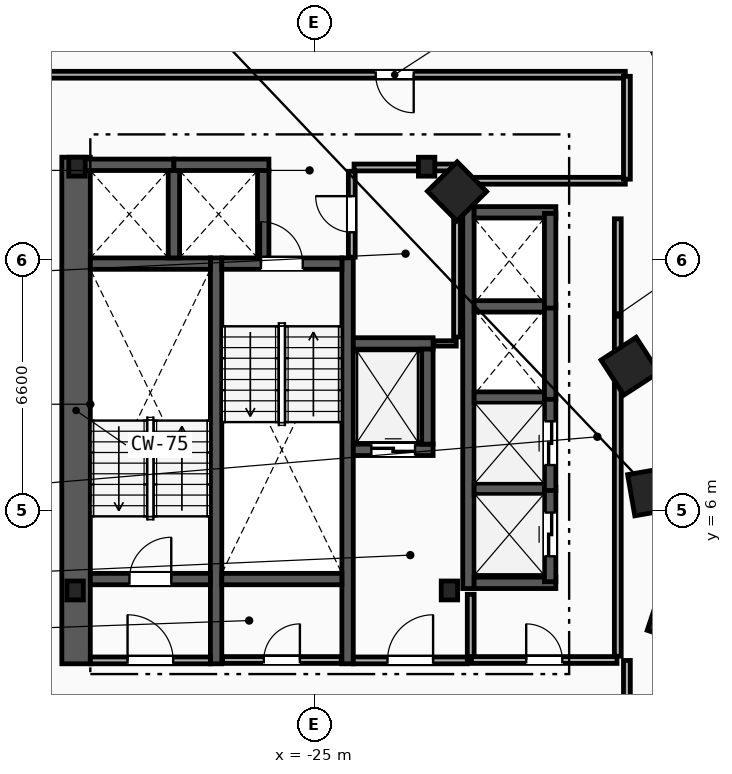
"""IFC4 building model, lengths in metres.
Left out: names, types, materials, properties, quantities, classifications, styles, units other than length and angle.
Written with IfcOpenShell. Run it as: python <this file> out.ifc"""

import sys

from ifc_helpers import new_model, si_unit, direction, frame, frame_2d, origin, origin_2d, place, context, subcontext, project, spatial, rectangle, i_section, extrude, element, fill, save


model = new_model("IFC4")
c1 = context("Model", 3, precision=1e-05, world=origin(), true_north=direction((0.0, 1.0)))
c2 = subcontext(c1, "Body", "Model", "MODEL_VIEW")
j1 = project(units=[si_unit("LENGTHUNIT", "METRE"), si_unit("PLANEANGLEUNIT", "RADIAN")], contexts=[c1])
p1 = place(None, origin())
s1 = spatial("IfcSite", under=j1, at=p1, CompositionType="ELEMENT")
p2 = place(p1, origin())
s2 = spatial("IfcBuilding", under=s1, at=p2, CompositionType="ELEMENT")
p3 = place(p2, frame((0.0, 0.0, 103.4)))
s3 = spatial("IfcBuildingStorey", under=s2, at=p3, CompositionType="ELEMENT", Elevation=103.4)
for number, where, z_axis, x_axis in (
    (1, (-31.3, 3.9, 0.0), (0.0, 0.0, 1.0), (1.0, 0.0, 0.0)),
    (2, (-21.45, 3.9, 0.0), (0.0, 0.0, 1.0), (1.0, 0.0, 0.0)),
    (3, (-22.05, 15.05, 0.0), (0.0, 0.0, 1.0), (1.0, 0.0, 0.0)),
    (4, (-31.25, 15.05, 0.0), (0.0, 0.0, 1.0), (1.0, 0.0, 0.0)),
):
    element("IfcColumn", number, at=place(p3, frame(where, z_axis=z_axis, x_axis=x_axis)), inside=s3, PredefinedType="COLUMN", context=c2, shape_type="SweptSolid", body=[
        extrude(i_section(OverallWidth=0.432, OverallDepth=0.498, WebThickness=0.056, FlangeThickness=0.089, FilletRadius=0.018, at=origin_2d()), origin(), (0.0, 0.0, 1.0), 3.6),
    ])
for number, where, z_axis, x_axis in (
    (5, (-15.55, 3.2, 0.0), (0.0, 0.0, 1.0), (0.315, 0.949, 0.0)),
    (6, (-16.125, 6.5, 0.0), (0.0, 0.0, 1.0), (-0.172, 0.985, 0.0)),
    (7, (-16.7, 9.8, 0.0), (0.0, 0.0, 1.0), (-0.544, 0.839, 0.0)),
    (8, (-21.25, 14.4, 0.0), (0.0, 0.0, 1.0), (-0.703, 0.711, 0.0)),
):
    element("IfcColumn", number, at=place(p3, frame(where, z_axis=z_axis, x_axis=x_axis)), inside=s3, PredefinedType="COLUMN", context=c2, shape_type="SweptSolid", body=[
        extrude(rectangle(XDim=1.1, YDim=1.1, at=origin_2d()), origin(), (0.0, 0.0, 1.0), 3.6),
    ])
p4 = place(p3, frame((-31.275, 1.97, 0.0), z_axis=(0.0, 0.0, 1.0), x_axis=(0.0, 1.0, 0.0)))
e9 = element("IfcWall", 9, at=p4, inside=s3, PredefinedType="SHEAR", context=c2, shape_type="SweptSolid", body=[
    extrude(rectangle(XDim=13.33, YDim=0.75, at=frame_2d((6.665, 0.0))), origin(), (0.0, 0.0, 1.0), 3.3),
])
for number, where, z_axis, x_axis in (
    (10, (-27.59, 1.97, 0.0), (0.0, 0.0, 1.0), (0.0, 1.0, 0.0)),
    (11, (-24.13, 1.97, 0.0), (0.0, 0.0, 1.0), (0.0, 1.0, 0.0)),
):
    element("IfcWall", number, at=place(p3, frame(where, z_axis=z_axis, x_axis=x_axis)), inside=s3, PredefinedType="SHEAR", context=c2, shape_type="SweptSolid", body=[
        extrude(rectangle(XDim=10.68, YDim=0.3, at=frame_2d((5.34, 0.0))), origin(), (0.0, 0.0, 1.0), 3.3),
    ])
p5 = place(p3, frame((-30.9, 4.2, 0.0), z_axis=(0.0, 0.0, 1.0), x_axis=(1.0, 0.0, 0.0)))
e12 = element("IfcWall", 12, at=p5, inside=s3, PredefinedType="SHEAR", context=c2, shape_type="SweptSolid", body=[
    extrude(rectangle(XDim=3.16, YDim=0.3, at=frame_2d((1.58, 0.0))), origin(), (0.0, 0.0, 1.0), 3.3),
])
p6 = place(p5, frame((1.03, 0.0, 0.0)))
e13 = element("IfcOpeningElement", 13, at=p6, cuts=e12, PredefinedType="OPENING", context=c2, shape_type="SweptSolid", body=[
    extrude(rectangle(XDim=1.1, YDim=2.15, at=frame_2d((0.55, 1.075))), frame((0.0, 0.16, 0.0), z_axis=(0.0, -1.0, 0.0), x_axis=(1.0, 0.0, 0.0)), (0.0, 0.0, 1.0), 0.32),
])
p7 = place(p3, frame((-30.9, 12.5, 0.0), z_axis=(0.0, 0.0, 1.0), x_axis=(1.0, 0.0, 0.0)))
e14 = element("IfcWall", 14, at=p7, inside=s3, PredefinedType="SHEAR", context=c2, shape_type="SweptSolid", body=[
    extrude(rectangle(XDim=3.16, YDim=0.3, at=frame_2d((1.58, 0.0))), origin(), (0.0, 0.0, 1.0), 3.3),
])
p8 = place(p3, frame((-27.44, 12.5, 0.0), z_axis=(0.0, 0.0, 1.0), x_axis=(1.0, 0.0, 0.0)))
e15 = element("IfcWall", 15, at=p8, inside=s3, PredefinedType="SHEAR", context=c2, shape_type="SweptSolid", body=[
    extrude(rectangle(XDim=3.16, YDim=0.3, at=frame_2d((1.58, 0.0))), origin(), (0.0, 0.0, 1.0), 3.3),
])
p9 = place(p8, frame((1.03, 0.0, 0.0)))
e16 = element("IfcOpeningElement", 16, at=p9, cuts=e15, PredefinedType="OPENING", context=c2, shape_type="SweptSolid", body=[
    extrude(rectangle(XDim=1.1, YDim=2.15, at=frame_2d((0.55, 1.075))), frame((0.0, 0.16, 0.0), z_axis=(0.0, -1.0, 0.0), x_axis=(1.0, 0.0, 0.0)), (0.0, 0.0, 1.0), 0.32),
])
p10 = place(p3, frame((-27.44, 4.2, 0.0), z_axis=(0.0, 0.0, 1.0), x_axis=(1.0, 0.0, 0.0)))
e17 = element("IfcWall", 17, at=p10, inside=s3, PredefinedType="SHEAR", context=c2, shape_type="SweptSolid", body=[
    extrude(rectangle(XDim=3.16, YDim=0.3, at=frame_2d((1.58, 0.0))), origin(), (0.0, 0.0, 1.0), 3.3),
])
p11 = place(p3, frame((-20.89, 2.15, 0.0), z_axis=(0.0, 0.0, 1.0), x_axis=(0.0, 1.0, 0.0)))
e18 = element("IfcWall", 18, at=p11, inside=s3, PredefinedType="PARTITIONING", context=c2, shape_type="SweptSolid", body=[
    extrude(rectangle(XDim=1.65, YDim=0.18, at=frame_2d((0.825, 0.0))), origin(), (0.0, 0.0, 1.0), 3.3),
])
p12 = place(p3, frame((-23.98, 2.06, 0.0), z_axis=(0.0, 0.0, 1.0), x_axis=(1.0, 0.0, 0.0)))
e19 = element("IfcWall", 19, at=p12, inside=s3, PredefinedType="PARTITIONING", context=c2, shape_type="SweptSolid", body=[
    extrude(rectangle(XDim=3.0, YDim=0.18, at=frame_2d((1.5, 0.0))), origin(), (0.0, 0.0, 1.0), 3.3),
])
p13 = place(p12, frame((0.9, 0.0, 0.0)))
e20 = element("IfcOpeningElement", 20, at=p13, cuts=e19, PredefinedType="OPENING", context=c2, shape_type="SweptSolid", body=[
    extrude(rectangle(XDim=1.2, YDim=2.15, at=frame_2d((0.6, 1.075))), frame((0.0, 0.1, 0.0), z_axis=(0.0, -1.0, 0.0), x_axis=(1.0, 0.0, 0.0)), (0.0, 0.0, 1.0), 0.2),
])
p14 = place(p3, frame((-30.9, 2.06, 0.0), z_axis=(0.0, 0.0, 1.0), x_axis=(1.0, 0.0, 0.0)))
e21 = element("IfcWall", 21, at=p14, inside=s3, PredefinedType="PARTITIONING", context=c2, shape_type="SweptSolid", body=[
    extrude(rectangle(XDim=3.16, YDim=0.18, at=frame_2d((1.58, 0.0))), origin(), (0.0, 0.0, 1.0), 3.3),
])
p15 = place(p14, frame((0.98, 0.0, 0.0)))
e22 = element("IfcOpeningElement", 22, at=p15, cuts=e21, PredefinedType="OPENING", context=c2, shape_type="SweptSolid", body=[
    extrude(rectangle(XDim=1.2, YDim=2.15, at=frame_2d((0.6, 1.075))), frame((0.0, 0.1, 0.0), z_axis=(0.0, -1.0, 0.0), x_axis=(1.0, 0.0, 0.0)), (0.0, 0.0, 1.0), 0.2),
])
p16 = place(p3, frame((-23.98, 7.6, 0.0), z_axis=(0.0, 0.0, 1.0), x_axis=(1.0, 0.0, 0.0)))
e23 = element("IfcWall", 23, at=p16, inside=s3, PredefinedType="SHEAR", context=c2, shape_type="SweptSolid", body=[
    extrude(rectangle(XDim=2.1, YDim=0.3, at=frame_2d((1.05, 0.0))), origin(), (0.0, 0.0, 1.0), 3.3),
])
p17 = place(p16, frame((0.475, 0.0, 0.0)))
e24 = element("IfcOpeningElement", 24, at=p17, cuts=e23, PredefinedType="OPENING", context=c2, shape_type="SweptSolid", body=[
    extrude(rectangle(XDim=1.15, YDim=2.2, at=frame_2d((0.575, 1.1))), frame((0.0, 0.16, 0.0), z_axis=(0.0, -1.0, 0.0), x_axis=(1.0, 0.0, 0.0)), (0.0, 0.0, 1.0), 0.32),
])
p18 = place(p3, frame((-23.98, 10.4, 0.0), z_axis=(0.0, 0.0, 1.0), x_axis=(1.0, 0.0, 0.0)))
e25 = element("IfcWall", 25, at=p18, inside=s3, PredefinedType="SHEAR", context=c2, shape_type="SweptSolid", body=[
    extrude(rectangle(XDim=2.1, YDim=0.3, at=frame_2d((1.05, 0.0))), origin(), (0.0, 0.0, 1.0), 3.3),
])
for number, where, z_axis, x_axis in (
    (26, (-22.03, 7.75, 0.0), (0.0, 0.0, 1.0), (0.0, 1.0, 0.0)),
    (27, (-31.2, 15.1, 0.0), (0.0, 0.0, 1.0), (1.0, 0.0, 0.0)),
):
    element("IfcWall", number, at=place(p3, frame(where, z_axis=z_axis, x_axis=x_axis)), inside=s3, PredefinedType="SHEAR", context=c2, shape_type="SweptSolid", body=[
        extrude(rectangle(XDim=2.5, YDim=0.3, at=frame_2d((1.25, 0.0))), origin(), (0.0, 0.0, 1.0), 3.3),
    ])
p19 = place(p3, frame((-28.7, 12.65, 0.0), z_axis=(0.0, 0.0, 1.0), x_axis=(0.0, 1.0, 0.0)))
e28 = element("IfcWall", 28, at=p19, inside=s3, PredefinedType="SHEAR", context=c2, shape_type="SweptSolid", body=[
    extrude(rectangle(XDim=2.3, YDim=0.3, at=frame_2d((1.15, 0.0))), origin(), (0.0, 0.0, 1.0), 3.3),
])
p20 = place(p3, frame((-28.7, 15.1, 0.0), z_axis=(0.0, 0.0, 1.0), x_axis=(1.0, 0.0, 0.0)))
e29 = element("IfcWall", 29, at=p20, inside=s3, PredefinedType="SHEAR", context=c2, shape_type="SweptSolid", body=[
    extrude(rectangle(XDim=2.5, YDim=0.3, at=frame_2d((1.25, 0.0))), origin(), (0.0, 0.0, 1.0), 3.3),
])
p21 = place(p3, frame((-26.35, 12.65, 0.0), z_axis=(0.0, 0.0, 1.0), x_axis=(0.0, 1.0, 0.0)))
e30 = element("IfcWall", 30, at=p21, inside=s3, PredefinedType="SHEAR", context=c2, shape_type="SweptSolid", body=[
    extrude(rectangle(XDim=2.3, YDim=0.3, at=frame_2d((1.15, 0.0))), origin(), (0.0, 0.0, 1.0), 3.3),
])
p22 = place(p3, frame((-20.95, 3.95, 0.0), z_axis=(0.0, 0.0, 1.0), x_axis=(0.0, 1.0, 0.0)))
e31 = element("IfcWall", 31, at=p22, inside=s3, PredefinedType="SHEAR", context=c2, shape_type="SweptSolid", body=[
    extrude(rectangle(XDim=10.05, YDim=0.3, at=frame_2d((5.025, 0.0))), origin(), (0.0, 0.0, 1.0), 3.3),
])
for number, where, z_axis, x_axis in (
    (32, (-20.8, 4.1, 0.0), (0.0, 0.0, 1.0), (1.0, 0.0, 0.0)),
    (33, (-20.8, 13.85, 0.0), (0.0, 0.0, 1.0), (1.0, 0.0, 0.0)),
):
    element("IfcWall", number, at=place(p3, frame(where, z_axis=z_axis, x_axis=x_axis)), inside=s3, PredefinedType="SHEAR", context=c2, shape_type="SweptSolid", body=[
        extrude(rectangle(XDim=2.15, YDim=0.3, at=frame_2d((1.075, 0.0))), origin(), (0.0, 0.0, 1.0), 3.3),
    ])
for number, where, z_axis, x_axis in (
    (34, (-20.8, 6.575, 0.0), (0.0, 0.0, 1.0), (1.0, 0.0, 0.0)),
    (35, (-20.8, 8.975, 0.0), (0.0, 0.0, 1.0), (1.0, 0.0, 0.0)),
    (36, (-20.8, 11.375, 0.0), (0.0, 0.0, 1.0), (1.0, 0.0, 0.0)),
):
    element("IfcWall", number, at=place(p3, frame(where, z_axis=z_axis, x_axis=x_axis)), inside=s3, PredefinedType="SHEAR", context=c2, shape_type="SweptSolid", body=[
        extrude(rectangle(XDim=1.85, YDim=0.3, at=frame_2d((0.925, 0.0))), origin(), (0.0, 0.0, 1.0), 3.3),
    ])
p23 = place(p3, frame((-18.8, 4.13, 0.0), z_axis=(0.0, 0.0, 1.0), x_axis=(0.0, 1.0, 0.0)))
e37 = element("IfcWall", 37, at=p23, inside=s3, PredefinedType="SHEAR", context=c2, shape_type="SweptSolid", body=[
    extrude(rectangle(XDim=2.49, YDim=0.3, at=frame_2d((1.245, 0.0))), origin(), (0.0, 0.0, 1.0), 3.3),
])
p24 = place(p23, frame((0.67, 0.0, 0.0)))
e38 = element("IfcOpeningElement", 38, at=p24, cuts=e37, PredefinedType="OPENING", context=c2, shape_type="SweptSolid", body=[
    extrude(rectangle(XDim=1.15, YDim=2.2, at=frame_2d((0.575, 1.1))), frame((0.0, 0.16, 0.0), z_axis=(0.0, -1.0, 0.0), x_axis=(1.0, 0.0, 0.0)), (0.0, 0.0, 1.0), 0.32),
])
p25 = place(p3, frame((-18.8, 6.53, 0.0), z_axis=(0.0, 0.0, 1.0), x_axis=(0.0, 1.0, 0.0)))
e39 = element("IfcWall", 39, at=p25, inside=s3, PredefinedType="SHEAR", context=c2, shape_type="SweptSolid", body=[
    extrude(rectangle(XDim=2.49, YDim=0.3, at=frame_2d((1.245, 0.0))), origin(), (0.0, 0.0, 1.0), 3.3),
])
p26 = place(p25, frame((0.67, 0.0, 0.0)))
e40 = element("IfcOpeningElement", 40, at=p26, cuts=e39, PredefinedType="OPENING", context=c2, shape_type="SweptSolid", body=[
    extrude(rectangle(XDim=1.15, YDim=2.2, at=frame_2d((0.575, 1.1))), frame((0.0, 0.16, 0.0), z_axis=(0.0, -1.0, 0.0), x_axis=(1.0, 0.0, 0.0)), (0.0, 0.0, 1.0), 0.32),
])
for number, where, z_axis, x_axis in (
    (41, (-18.8, 8.93, 0.0), (0.0, 0.0, 1.0), (0.0, 1.0, 0.0)),
    (42, (-18.8, 11.33, 0.0), (0.0, 0.0, 1.0), (0.0, 1.0, 0.0)),
):
    element("IfcWall", number, at=place(p3, frame(where, z_axis=z_axis, x_axis=x_axis)), inside=s3, PredefinedType="SHEAR", context=c2, shape_type="SweptSolid", body=[
        extrude(rectangle(XDim=2.49, YDim=0.3, at=frame_2d((1.245, 0.0))), origin(), (0.0, 0.0, 1.0), 3.3),
    ])
p27 = place(p3, frame((-17.02, 2.17, 0.0), z_axis=(0.0, 0.0, 1.0), x_axis=(0.0, 1.0, 0.0)))
e43 = element("IfcWall", 43, at=p27, inside=s3, PredefinedType="PARTITIONING", context=c2, shape_type="SweptSolid", body=[
    extrude(rectangle(XDim=11.51, YDim=0.18, at=frame_2d((5.755, 0.0))), origin(), (0.0, 0.0, 1.0), 3.3),
])
p28 = place(p3, frame((-20.87, 2.07, 0.0), z_axis=(0.0, 0.0, 1.0), x_axis=(1.0, 0.0, 0.0)))
e44 = element("IfcWall", 44, at=p28, inside=s3, PredefinedType="PARTITIONING", context=c2, shape_type="SweptSolid", body=[
    extrude(rectangle(XDim=3.83, YDim=0.18, at=frame_2d((1.915, 0.0))), origin(), (0.0, 0.0, 1.0), 3.3),
])
p29 = place(p28, frame((1.44, 0.0, 0.0)))
e45 = element("IfcOpeningElement", 45, at=p29, cuts=e44, PredefinedType="OPENING", context=c2, shape_type="SweptSolid", body=[
    extrude(rectangle(XDim=0.95, YDim=2.1, at=frame_2d((0.475, 1.05))), frame((0.0, 0.1, 0.0), z_axis=(0.0, -1.0, 0.0), x_axis=(1.0, 0.0, 0.0)), (0.0, 0.0, 1.0), 0.2),
])
p30 = place(p3, frame((-21.86, 10.4, 0.0), z_axis=(0.0, 0.0, 1.0), x_axis=(1.0, 0.0, 0.0)))
e46 = element("IfcWall", 46, at=p30, inside=s3, PredefinedType="PARTITIONING", context=c2, shape_type="SweptSolid", body=[
    extrude(rectangle(XDim=0.59, YDim=0.14, at=frame_2d((0.295, 0.0))), origin(), (0.0, 0.0, 1.0), 3.3),
])
p31 = place(p3, frame((-21.25, 10.57, 0.0), z_axis=(0.0, 0.0, 1.0), x_axis=(0.0, 1.0, 0.0)))
e47 = element("IfcWall", 47, at=p31, inside=s3, PredefinedType="PARTITIONING", context=c2, shape_type="SweptSolid", body=[
    extrude(rectangle(XDim=4.36, YDim=0.18, at=frame_2d((2.18, 0.0))), origin(), (0.0, 0.0, 1.0), 3.3),
])
p32 = place(p3, frame((-23.96, 15.03, 0.0), z_axis=(0.0, 0.0, 1.0), x_axis=(1.0, 0.0, 0.0)))
e48 = element("IfcWall", 48, at=p32, inside=s3, PredefinedType="PARTITIONING", context=c2, shape_type="SweptSolid", body=[
    extrude(rectangle(XDim=2.61, YDim=0.18, at=frame_2d((1.305, 0.0))), origin(), (0.0, 0.0, 1.0), 2.373),
])
p33 = place(p3, frame((-27.42, 2.07, 0.0), z_axis=(0.0, 0.0, 1.0), x_axis=(1.0, 0.0, 0.0)))
e49 = element("IfcWall", 49, at=p33, inside=s3, PredefinedType="PARTITIONING", context=c2, shape_type="SweptSolid", body=[
    extrude(rectangle(XDim=3.12, YDim=0.18, at=frame_2d((1.56, 0.0))), origin(), (0.0, 0.0, 1.0), 3.3),
])
p34 = place(p33, frame((1.085, 0.0, 0.0)))
e50 = element("IfcOpeningElement", 50, at=p34, cuts=e49, PredefinedType="OPENING", context=c2, shape_type="SweptSolid", body=[
    extrude(rectangle(XDim=0.95, YDim=2.1, at=frame_2d((0.475, 1.05))), frame((0.0, 0.1, 0.0), z_axis=(0.0, -1.0, 0.0), x_axis=(1.0, 0.0, 0.0)), (0.0, 0.0, 1.0), 0.2),
])
p35 = place(p3, frame((-24.02, 12.67, 0.0), z_axis=(0.0, 0.0, 1.0), x_axis=(0.0, 1.0, 0.0)))
e51 = element("IfcWall", 51, at=p35, inside=s3, PredefinedType="PARTITIONING", context=c2, shape_type="SweptSolid", body=[
    extrude(rectangle(XDim=2.26, YDim=0.18, at=frame_2d((1.13, 0.0))), origin(), (0.0, 0.0, 1.0), 3.3),
])
p36 = place(p35, frame((0.655, 0.0, 0.0)))
e52 = element("IfcOpeningElement", 52, at=p36, cuts=e51, PredefinedType="OPENING", context=c2, shape_type="SweptSolid", body=[
    extrude(rectangle(XDim=0.95, YDim=2.1, at=frame_2d((0.475, 1.05))), frame((0.0, 0.1, 0.0), z_axis=(0.0, -1.0, 0.0), x_axis=(1.0, 0.0, 0.0)), (0.0, 0.0, 1.0), 0.2),
])
p37 = place(p3, frame((-16.822, 17.47, 0.0), z_axis=(0.0, 0.0, 1.0), x_axis=(-1.0, 0.0, 0.0)))
e53 = element("IfcWall", 53, at=p37, inside=s3, PredefinedType="PARTITIONING", context=c2, shape_type="SweptSolid", body=[
    extrude(rectangle(XDim=16.807, YDim=0.18, at=frame_2d((8.403, 0.0))), origin(), (0.0, 0.0, 1.0), 3.3),
])
p38 = place(p37, frame((5.569, 0.0, 0.0)))
e54 = element("IfcOpeningElement", 54, at=p38, cuts=e53, PredefinedType="OPENING", context=c2, shape_type="SweptSolid", body=[
    extrude(rectangle(XDim=1.0, YDim=2.15, at=frame_2d((0.5, 1.075))), frame((0.0, 0.1, 0.0), z_axis=(0.0, -1.0, 0.0), x_axis=(1.0, 0.0, 0.0)), (0.0, 0.0, 1.0), 0.2),
])
p39 = place(p3, frame((-21.178, 14.68, 0.0), z_axis=(0.0, 0.0, 1.0), x_axis=(1.0, 0.0, 0.0)))
e55 = element("IfcWall", 55, at=p39, inside=s3, PredefinedType="PARTITIONING", context=c2, shape_type="SweptSolid", body=[
    extrude(rectangle(XDim=4.357, YDim=0.18, at=frame_2d((2.178, 0.0))), origin(), (0.0, 0.0, 1.0), 3.3),
])
p40 = place(p3, frame((-16.78, 14.721, 0.0), z_axis=(0.0, 0.0, 1.0), x_axis=(0.0, 1.0, 0.0)))
e56 = element("IfcWall", 56, at=p40, inside=s3, PredefinedType="PARTITIONING", context=c2, shape_type="SweptSolid", body=[
    extrude(rectangle(XDim=2.707, YDim=0.18, at=frame_2d((1.354, 0.0))), origin(), (0.0, 0.0, 1.0), 3.3),
])
p41 = place(p3, frame((-16.78, -0.329, 0.0), z_axis=(0.0, 0.0, 1.0), x_axis=(0.0, 1.0, 0.0)))
e57 = element("IfcWall", 57, at=p41, inside=s3, PredefinedType="PARTITIONING", context=c2, shape_type="SweptSolid", body=[
    extrude(rectangle(XDim=2.387, YDim=0.18, at=frame_2d((1.194, 0.0))), origin(), (0.0, 0.0, 1.0), 3.3),
])
p42 = place(p6, origin())
e58 = element("IfcDoor", 58, at=p42, inside=s3, OperationType="SINGLE_SWING_RIGHT", PredefinedType="DOOR", context=c2, shape_type="SweptSolid", body=[
    extrude(rectangle(XDim=1.1, YDim=2.15, at=frame_2d((0.55, 1.075))), frame((0.0, 0.025, 0.0), z_axis=(0.0, -1.0, 0.0), x_axis=(1.0, 0.0, 0.0)), (0.0, 0.0, 1.0), 0.05),
])
fill(e13, e58)
p43 = place(p9, origin())
e59 = element("IfcDoor", 59, at=p43, inside=s3, OperationType="SINGLE_SWING_LEFT", PredefinedType="DOOR", context=c2, shape_type="SweptSolid", body=[
    extrude(rectangle(XDim=1.1, YDim=2.15, at=frame_2d((0.55, 1.075))), frame((0.0, 0.025, 0.0), z_axis=(0.0, -1.0, 0.0), x_axis=(1.0, 0.0, 0.0)), (0.0, 0.0, 1.0), 0.05),
])
fill(e16, e59)
p44 = place(p13, origin())
e60 = element("IfcDoor", 60, at=p44, inside=s3, OperationType="SINGLE_SWING_RIGHT", PredefinedType="DOOR", context=c2, shape_type="SweptSolid", body=[
    extrude(rectangle(XDim=1.2, YDim=2.15, at=frame_2d((0.6, 1.075))), frame((0.0, 0.025, 0.0), z_axis=(0.0, -1.0, 0.0), x_axis=(1.0, 0.0, 0.0)), (0.0, 0.0, 1.0), 0.05),
])
fill(e20, e60)
p45 = place(p15, origin())
e61 = element("IfcDoor", 61, at=p45, inside=s3, OperationType="SINGLE_SWING_LEFT", PredefinedType="DOOR", context=c2, shape_type="SweptSolid", body=[
    extrude(rectangle(XDim=1.2, YDim=2.15, at=frame_2d((0.6, 1.075))), frame((0.0, 0.025, 0.0), z_axis=(0.0, -1.0, 0.0), x_axis=(1.0, 0.0, 0.0)), (0.0, 0.0, 1.0), 0.05),
])
fill(e22, e61)
p46 = place(p17, origin())
e62 = element("IfcDoor", 62, at=p46, inside=s3, OperationType="SLIDING_TO_LEFT", PredefinedType="TRAPDOOR", context=c2, shape_type="SweptSolid", body=[
    extrude(rectangle(XDim=1.15, YDim=2.2, at=frame_2d((0.575, 1.1))), frame((0.0, 0.025, 0.0), z_axis=(0.0, -1.0, 0.0), x_axis=(1.0, 0.0, 0.0)), (0.0, 0.0, 1.0), 0.05),
])
fill(e24, e62)
p47 = place(p24, origin())
e63 = element("IfcDoor", 63, at=p47, inside=s3, OperationType="SLIDING_TO_LEFT", PredefinedType="TRAPDOOR", context=c2, shape_type="SweptSolid", body=[
    extrude(rectangle(XDim=1.15, YDim=2.2, at=frame_2d((0.575, 1.1))), frame((0.0, 0.025, 0.0), z_axis=(0.0, -1.0, 0.0), x_axis=(1.0, 0.0, 0.0)), (0.0, 0.0, 1.0), 0.05),
])
fill(e38, e63)
p48 = place(p26, origin())
e64 = element("IfcDoor", 64, at=p48, inside=s3, OperationType="SLIDING_TO_LEFT", PredefinedType="TRAPDOOR", context=c2, shape_type="SweptSolid", body=[
    extrude(rectangle(XDim=1.15, YDim=2.2, at=frame_2d((0.575, 1.1))), frame((0.0, 0.025, 0.0), z_axis=(0.0, -1.0, 0.0), x_axis=(1.0, 0.0, 0.0)), (0.0, 0.0, 1.0), 0.05),
])
fill(e40, e64)
p49 = place(p38, origin())
e65 = element("IfcDoor", 65, at=p49, inside=s3, OperationType="SINGLE_SWING_LEFT", PredefinedType="DOOR", context=c2, shape_type="SweptSolid", body=[
    extrude(rectangle(XDim=1.0, YDim=2.15, at=frame_2d((0.5, 1.075))), frame((0.0, 0.025, 0.0), z_axis=(0.0, -1.0, 0.0), x_axis=(1.0, 0.0, 0.0)), (0.0, 0.0, 1.0), 0.05),
])
fill(e54, e65)
p50 = place(p29, origin())
e66 = element("IfcDoor", 66, at=p50, inside=s3, OperationType="SINGLE_SWING_LEFT", PredefinedType="DOOR", context=c2, shape_type="SweptSolid", body=[
    extrude(rectangle(XDim=0.95, YDim=2.1, at=frame_2d((0.475, 1.05))), frame((0.0, 0.025, 0.0), z_axis=(0.0, -1.0, 0.0), x_axis=(1.0, 0.0, 0.0)), (0.0, 0.0, 1.0), 0.05),
])
fill(e45, e66)
p51 = place(p34, origin())
e67 = element("IfcDoor", 67, at=p51, inside=s3, OperationType="SINGLE_SWING_RIGHT", PredefinedType="DOOR", context=c2, shape_type="SweptSolid", body=[
    extrude(rectangle(XDim=0.95, YDim=2.1, at=frame_2d((0.475, 1.05))), frame((0.0, 0.025, 0.0), z_axis=(0.0, -1.0, 0.0), x_axis=(1.0, 0.0, 0.0)), (0.0, 0.0, 1.0), 0.05),
])
fill(e50, e67)
p52 = place(p36, origin())
e68 = element("IfcDoor", 68, at=p52, inside=s3, OperationType="SINGLE_SWING_RIGHT", PredefinedType="DOOR", context=c2, shape_type="SweptSolid", body=[
    extrude(rectangle(XDim=0.95, YDim=2.1, at=frame_2d((0.475, 1.05))), frame((0.0, 0.025, 0.0), z_axis=(0.0, -1.0, 0.0), x_axis=(1.0, 0.0, 0.0)), (0.0, 0.0, 1.0), 0.05),
])
fill(e52, e68)
save(model, sys.argv[1])
